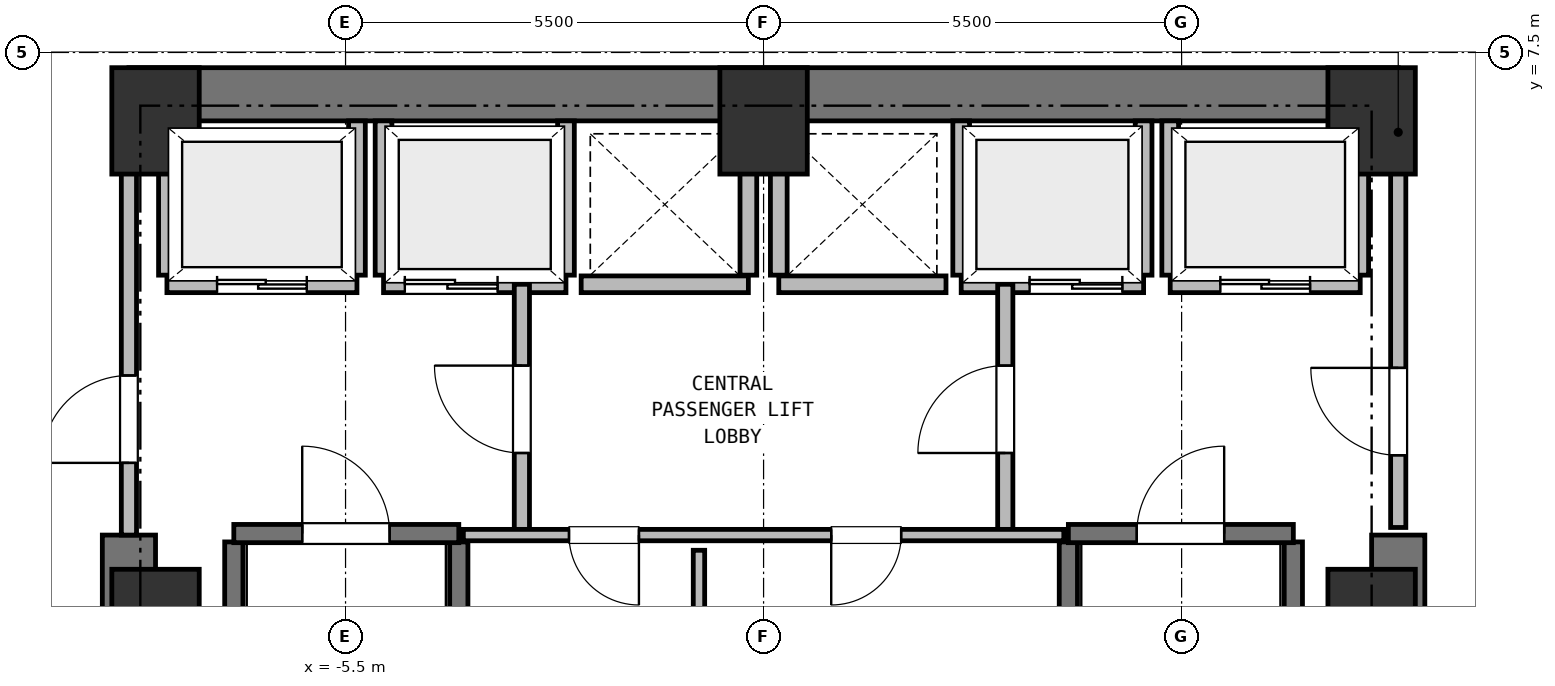
"""IFC4 building model, lengths in metres.
Left out: names, types, materials, properties, quantities, classifications, styles, units other than length and angle.
Written with IfcOpenShell. Run it as: python <this file> out.ifc"""

import sys

from ifc_helpers import new_model, si_unit, direction, frame, frame_2d, origin, origin_2d, place, context, subcontext, project, spatial, rectangle, extrude, element, fill, save


model = new_model("IFC4")
c1 = context("Model", 3, precision=1e-05, world=origin(), true_north=direction((0.0, 1.0)))
c2 = subcontext(c1, "Body", "Model", "MODEL_VIEW")
j1 = project(units=[si_unit("LENGTHUNIT", "METRE"), si_unit("PLANEANGLEUNIT", "RADIAN")], contexts=[c1])
p1 = place(None, origin())
s1 = spatial("IfcSite", under=j1, at=p1, CompositionType="ELEMENT")
p2 = place(p1, origin())
s2 = spatial("IfcBuilding", under=s1, at=p2, CompositionType="ELEMENT")
p3 = place(p2, frame((0.0, 0.0, 34.25)))
s3 = spatial("IfcBuildingStorey", under=s2, at=p3, CompositionType="ELEMENT", Elevation=34.25)
for number, where, z_axis, x_axis in (
    (1, (8.0, 0.0, 0.0), (0.0, 0.0, 1.0), (1.0, 0.0, 0.0)),
    (2, (8.0, 6.6, 0.0), (0.0, 0.0, 1.0), (1.0, 0.0, 0.0)),
    (3, (0.0, 6.6, 0.0), (0.0, 0.0, 1.0), (1.0, 0.0, 0.0)),
    (4, (-8.0, 6.6, 0.0), (0.0, 0.0, 1.0), (1.0, 0.0, 0.0)),
    (5, (-8.0, 0.0, 0.0), (0.0, 0.0, 1.0), (1.0, 0.0, 0.0)),
):
    element("IfcColumn", number, at=place(p3, frame(where, z_axis=z_axis, x_axis=x_axis)), inside=s3, PredefinedType="COLUMN", context=c2, shape_type="SweptSolid", body=[
        extrude(rectangle(XDim=1.15, YDim=1.4, at=origin_2d()), origin(), (0.0, 0.0, 1.0), 3.75),
    ])
p4 = place(p3, frame((-8.35, 6.95, 0.0), z_axis=(0.0, 0.0, 1.0), x_axis=(1.0, 0.0, 0.0)))
e6 = element("IfcWall", 6, at=p4, inside=s3, PredefinedType="SHEAR", context=c2, shape_type="SweptSolid", body=[
    extrude(rectangle(XDim=16.7, YDim=0.7, at=frame_2d((8.35, 0.0))), origin(), (0.0, 0.0, 1.0), 3.5),
])
for number, where, z_axis, x_axis in (
    (7, (-8.35, -6.95, 0.0), (0.0, 0.0, 1.0), (0.0, 1.0, 0.0)),
    (8, (8.35, -6.95, 0.0), (0.0, 0.0, 1.0), (0.0, 1.0, 0.0)),
):
    element("IfcWall", number, at=place(p3, frame(where, z_axis=z_axis, x_axis=x_axis)), inside=s3, PredefinedType="SHEAR", context=c2, shape_type="SweptSolid", body=[
        extrude(rectangle(XDim=8.1, YDim=0.7, at=frame_2d((4.05, 0.0))), origin(), (0.0, 0.0, 1.0), 3.5),
    ])
for number, where, z_axis, x_axis in (
    (9, (-6.97, -6.16, 0.0), (0.0, 0.0, 1.0), (0.0, 1.0, 0.0)),
    (10, (-4.01, -6.16, 0.0), (0.0, 0.0, 1.0), (0.0, 1.0, 0.0)),
):
    element("IfcWall", number, at=place(p3, frame(where, z_axis=z_axis, x_axis=x_axis)), inside=s3, PredefinedType="SHEAR", context=c2, shape_type="SweptSolid", body=[
        extrude(rectangle(XDim=7.22, YDim=0.24, at=frame_2d((3.61, 0.0))), origin(), (0.0, 0.0, 1.0), 3.5),
    ])
p5 = place(p3, frame((-6.97, 1.17, 0.0), z_axis=(0.0, 0.0, 1.0), x_axis=(1.0, 0.0, 0.0)))
e11 = element("IfcWall", 11, at=p5, inside=s3, PredefinedType="SHEAR", context=c2, shape_type="SweptSolid", body=[
    extrude(rectangle(XDim=2.96, YDim=0.24, at=frame_2d((1.48, 0.0))), origin(), (0.0, 0.0, 1.0), 3.5),
])
p6 = place(p5, frame((0.9, 0.0, 0.0)))
e12 = element("IfcOpeningElement", 12, at=p6, cuts=e11, PredefinedType="OPENING", context=c2, shape_type="SweptSolid", body=[
    extrude(rectangle(XDim=1.15, YDim=2.15, at=frame_2d((0.575, 1.075))), frame((0.0, 0.13, 0.0), z_axis=(0.0, -1.0, 0.0), x_axis=(1.0, 0.0, 0.0)), (0.0, 0.0, 1.0), 0.26),
])
for number, where, z_axis, x_axis in (
    (13, (4.01, -6.16, 0.0), (0.0, 0.0, 1.0), (0.0, 1.0, 0.0)),
    (14, (6.97, -6.16, 0.0), (0.0, 0.0, 1.0), (0.0, 1.0, 0.0)),
):
    element("IfcWall", number, at=place(p3, frame(where, z_axis=z_axis, x_axis=x_axis)), inside=s3, PredefinedType="SHEAR", context=c2, shape_type="SweptSolid", body=[
        extrude(rectangle(XDim=7.22, YDim=0.24, at=frame_2d((3.61, 0.0))), origin(), (0.0, 0.0, 1.0), 3.5),
    ])
p7 = place(p3, frame((4.01, 1.17, 0.0), z_axis=(0.0, 0.0, 1.0), x_axis=(1.0, 0.0, 0.0)))
e15 = element("IfcWall", 15, at=p7, inside=s3, PredefinedType="SHEAR", context=c2, shape_type="SweptSolid", body=[
    extrude(rectangle(XDim=2.96, YDim=0.24, at=frame_2d((1.48, 0.0))), origin(), (0.0, 0.0, 1.0), 3.5),
])
p8 = place(p7, frame((0.9, 0.0, 0.0)))
e16 = element("IfcOpeningElement", 16, at=p8, cuts=e15, PredefinedType="OPENING", context=c2, shape_type="SweptSolid", body=[
    extrude(rectangle(XDim=1.15, YDim=2.15, at=frame_2d((0.575, 1.075))), frame((0.0, 0.13, 0.0), z_axis=(0.0, -1.0, 0.0), x_axis=(1.0, 0.0, 0.0)), (0.0, 0.0, 1.0), 0.26),
])
p9 = place(p3, frame((-7.85, 4.45, 0.0), z_axis=(0.0, 0.0, 1.0), x_axis=(1.0, 0.0, 0.0)))
e17 = element("IfcWall", 17, at=p9, inside=s3, PredefinedType="PARTITIONING", context=c2, shape_type="SweptSolid", body=[
    extrude(rectangle(XDim=2.5, YDim=0.22, at=frame_2d((1.25, 0.0))), origin(), (0.0, 0.0, 1.0), 3.5),
])
p10 = place(p9, frame((0.66, 0.0, 0.0)))
e18 = element("IfcOpeningElement", 18, at=p10, cuts=e17, PredefinedType="OPENING", context=c2, shape_type="SweptSolid", body=[
    extrude(rectangle(XDim=1.18, YDim=2.15, at=frame_2d((0.59, 1.075))), frame((0.0, 0.12, 0.0), z_axis=(0.0, -1.0, 0.0), x_axis=(1.0, 0.0, 0.0)), (0.0, 0.0, 1.0), 0.24),
])
p11 = place(p3, frame((-7.85, 4.57, 0.0), z_axis=(0.0, 0.0, 1.0), x_axis=(0.0, 1.0, 0.0)))
e19 = element("IfcWall", 19, at=p11, inside=s3, PredefinedType="PARTITIONING", context=c2, shape_type="SweptSolid", body=[
    extrude(rectangle(XDim=2.03, YDim=0.22, at=frame_2d((1.015, 0.0))), origin(), (0.0, 0.0, 1.0), 3.08),
])
p12 = place(p3, frame((-5.35, 4.57, 0.0), z_axis=(0.0, 0.0, 1.0), x_axis=(0.0, 1.0, 0.0)))
e20 = element("IfcWall", 20, at=p12, inside=s3, PredefinedType="PARTITIONING", context=c2, shape_type="SweptSolid", body=[
    extrude(rectangle(XDim=2.03, YDim=0.22, at=frame_2d((1.015, 0.0))), origin(), (0.0, 0.0, 1.0), 3.5),
])
p13 = place(p3, frame((5.35, 4.45, 0.0), z_axis=(0.0, 0.0, 1.0), x_axis=(1.0, 0.0, 0.0)))
e21 = element("IfcWall", 21, at=p13, inside=s3, PredefinedType="PARTITIONING", context=c2, shape_type="SweptSolid", body=[
    extrude(rectangle(XDim=2.5, YDim=0.22, at=frame_2d((1.25, 0.0))), origin(), (0.0, 0.0, 1.0), 3.5),
])
p14 = place(p13, frame((0.66, 0.0, 0.0)))
e22 = element("IfcOpeningElement", 22, at=p14, cuts=e21, PredefinedType="OPENING", context=c2, shape_type="SweptSolid", body=[
    extrude(rectangle(XDim=1.18, YDim=2.15, at=frame_2d((0.59, 1.075))), frame((0.0, 0.12, 0.0), z_axis=(0.0, -1.0, 0.0), x_axis=(1.0, 0.0, 0.0)), (0.0, 0.0, 1.0), 0.24),
])
p15 = place(p3, frame((5.35, 4.57, 0.0), z_axis=(0.0, 0.0, 1.0), x_axis=(0.0, 1.0, 0.0)))
e23 = element("IfcWall", 23, at=p15, inside=s3, PredefinedType="PARTITIONING", context=c2, shape_type="SweptSolid", body=[
    extrude(rectangle(XDim=2.03, YDim=0.22, at=frame_2d((1.015, 0.0))), origin(), (0.0, 0.0, 1.0), 3.5),
])
p16 = place(p3, frame((7.85, 4.57, 0.0), z_axis=(0.0, 0.0, 1.0), x_axis=(0.0, 1.0, 0.0)))
e24 = element("IfcWall", 24, at=p16, inside=s3, PredefinedType="PARTITIONING", context=c2, shape_type="SweptSolid", body=[
    extrude(rectangle(XDim=2.03, YDim=0.22, at=frame_2d((1.015, 0.0))), origin(), (0.0, 0.0, 1.0), 3.08),
])
p17 = place(p3, frame((-5.0, 4.45, 0.0), z_axis=(0.0, 0.0, 1.0), x_axis=(1.0, 0.0, 0.0)))
e25 = element("IfcWall", 25, at=p17, inside=s3, PredefinedType="PARTITIONING", context=c2, shape_type="SweptSolid", body=[
    extrude(rectangle(XDim=2.4, YDim=0.22, at=frame_2d((1.2, 0.0))), origin(), (0.0, 0.0, 1.0), 3.5),
])
p18 = place(p17, frame((0.28, 0.0, 0.0)))
e26 = element("IfcOpeningElement", 26, at=p18, cuts=e25, PredefinedType="OPENING", context=c2, shape_type="SweptSolid", body=[
    extrude(rectangle(XDim=1.22, YDim=2.15, at=frame_2d((0.61, 1.075))), frame((0.0, 0.12, 0.0), z_axis=(0.0, -1.0, 0.0), x_axis=(1.0, 0.0, 0.0)), (0.0, 0.0, 1.0), 0.24),
])
for number, where, z_axis, x_axis in (
    (27, (-5.0, 4.57, 0.0), (0.0, 0.0, 1.0), (0.0, 1.0, 0.0)),
    (28, (-2.6, 4.57, 0.0), (0.0, 0.0, 1.0), (0.0, 1.0, 0.0)),
):
    element("IfcWall", number, at=place(p3, frame(where, z_axis=z_axis, x_axis=x_axis)), inside=s3, PredefinedType="PARTITIONING", context=c2, shape_type="SweptSolid", body=[
        extrude(rectangle(XDim=2.03, YDim=0.22, at=frame_2d((1.015, 0.0))), origin(), (0.0, 0.0, 1.0), 3.5),
    ])
p19 = place(p3, frame((2.6, 4.45, 0.0), z_axis=(0.0, 0.0, 1.0), x_axis=(1.0, 0.0, 0.0)))
e29 = element("IfcWall", 29, at=p19, inside=s3, PredefinedType="PARTITIONING", context=c2, shape_type="SweptSolid", body=[
    extrude(rectangle(XDim=2.4, YDim=0.22, at=frame_2d((1.2, 0.0))), origin(), (0.0, 0.0, 1.0), 3.5),
])
p20 = place(p19, frame((0.9, 0.0, 0.0)))
e30 = element("IfcOpeningElement", 30, at=p20, cuts=e29, PredefinedType="OPENING", context=c2, shape_type="SweptSolid", body=[
    extrude(rectangle(XDim=1.22, YDim=2.15, at=frame_2d((0.61, 1.075))), frame((0.0, 0.12, 0.0), z_axis=(0.0, -1.0, 0.0), x_axis=(1.0, 0.0, 0.0)), (0.0, 0.0, 1.0), 0.24),
])
for number, where, z_axis, x_axis in (
    (31, (2.6, 4.57, 0.0), (0.0, 0.0, 1.0), (0.0, 1.0, 0.0)),
    (32, (5.0, 4.57, 0.0), (0.0, 0.0, 1.0), (0.0, 1.0, 0.0)),
):
    element("IfcWall", number, at=place(p3, frame(where, z_axis=z_axis, x_axis=x_axis)), inside=s3, PredefinedType="PARTITIONING", context=c2, shape_type="SweptSolid", body=[
        extrude(rectangle(XDim=2.03, YDim=0.22, at=frame_2d((1.015, 0.0))), origin(), (0.0, 0.0, 1.0), 3.5),
    ])
p21 = place(p3, frame((-2.4, 4.45, 0.0), z_axis=(0.0, 0.0, 1.0), x_axis=(1.0, 0.0, 0.0)))
e33 = element("IfcWall", 33, at=p21, inside=s3, PredefinedType="PARTITIONING", context=c2, shape_type="SweptSolid", body=[
    extrude(rectangle(XDim=2.2, YDim=0.22, at=frame_2d((1.1, 0.0))), origin(), (0.0, 0.0, 1.0), 3.5),
])
p22 = place(p3, frame((-0.2, 4.57, 0.0), z_axis=(0.0, 0.0, 1.0), x_axis=(0.0, 1.0, 0.0)))
e34 = element("IfcWall", 34, at=p22, inside=s3, PredefinedType="PARTITIONING", context=c2, shape_type="SweptSolid", body=[
    extrude(rectangle(XDim=2.03, YDim=0.22, at=frame_2d((1.015, 0.0))), origin(), (0.0, 0.0, 1.0), 3.5),
])
p23 = place(p3, frame((0.2, 4.45, 0.0), z_axis=(0.0, 0.0, 1.0), x_axis=(1.0, 0.0, 0.0)))
e35 = element("IfcWall", 35, at=p23, inside=s3, PredefinedType="PARTITIONING", context=c2, shape_type="SweptSolid", body=[
    extrude(rectangle(XDim=2.2, YDim=0.22, at=frame_2d((1.1, 0.0))), origin(), (0.0, 0.0, 1.0), 3.5),
])
p24 = place(p3, frame((0.2, 4.57, 0.0), z_axis=(0.0, 0.0, 1.0), x_axis=(0.0, 1.0, 0.0)))
e36 = element("IfcWall", 36, at=p24, inside=s3, PredefinedType="PARTITIONING", context=c2, shape_type="SweptSolid", body=[
    extrude(rectangle(XDim=2.03, YDim=0.22, at=frame_2d((1.015, 0.0))), origin(), (0.0, 0.0, 1.0), 3.5),
])
p25 = place(p3, frame((-3.18, 1.15, 0.0), z_axis=(0.0, 0.0, 1.0), x_axis=(0.0, 1.0, 0.0)))
e37 = element("IfcWall", 37, at=p25, inside=s3, PredefinedType="PARTITIONING", context=c2, shape_type="SweptSolid", body=[
    extrude(rectangle(XDim=3.3, YDim=0.2, at=frame_2d((1.65, 0.0))), origin(), (0.0, 0.0, 1.0), 3.5),
])
p26 = place(p25, frame((1.08, 0.0, 0.0)))
e38 = element("IfcOpeningElement", 38, at=p26, cuts=e37, PredefinedType="OPENING", context=c2, shape_type="SweptSolid", body=[
    extrude(rectangle(XDim=1.15, YDim=2.15, at=frame_2d((0.575, 1.075))), frame((0.0, 0.11, 0.0), z_axis=(0.0, -1.0, 0.0), x_axis=(1.0, 0.0, 0.0)), (0.0, 0.0, 1.0), 0.22),
])
p27 = place(p3, frame((3.18, 1.15, 0.0), z_axis=(0.0, 0.0, 1.0), x_axis=(0.0, 1.0, 0.0)))
e39 = element("IfcWall", 39, at=p27, inside=s3, PredefinedType="PARTITIONING", context=c2, shape_type="SweptSolid", body=[
    extrude(rectangle(XDim=3.3, YDim=0.2, at=frame_2d((1.65, 0.0))), origin(), (0.0, 0.0, 1.0), 3.5),
])
p28 = place(p27, frame((1.08, 0.0, 0.0)))
e40 = element("IfcOpeningElement", 40, at=p28, cuts=e39, PredefinedType="OPENING", context=c2, shape_type="SweptSolid", body=[
    extrude(rectangle(XDim=1.15, YDim=2.15, at=frame_2d((0.575, 1.075))), frame((0.0, 0.11, 0.0), z_axis=(0.0, -1.0, 0.0), x_axis=(1.0, 0.0, 0.0)), (0.0, 0.0, 1.0), 0.22),
])
p29 = place(p3, frame((-8.35, 1.15, 0.0), z_axis=(0.0, 0.0, 1.0), x_axis=(0.0, 1.0, 0.0)))
e41 = element("IfcWall", 41, at=p29, inside=s3, PredefinedType="PARTITIONING", context=c2, shape_type="SweptSolid", body=[
    extrude(rectangle(XDim=5.4, YDim=0.2, at=frame_2d((2.7, 0.0))), origin(), (0.0, 0.0, 1.0), 3.5),
])
p30 = place(p29, frame((0.95, 0.0, 0.0)))
e42 = element("IfcOpeningElement", 42, at=p30, cuts=e41, PredefinedType="OPENING", context=c2, shape_type="SweptSolid", body=[
    extrude(rectangle(XDim=1.15, YDim=2.15, at=frame_2d((0.575, 1.075))), frame((0.0, 0.11, 0.0), z_axis=(0.0, -1.0, 0.0), x_axis=(1.0, 0.0, 0.0)), (0.0, 0.0, 1.0), 0.22),
])
p31 = place(p3, frame((8.35, 1.25, 0.0), z_axis=(0.0, 0.0, 1.0), x_axis=(0.0, 1.0, 0.0)))
e43 = element("IfcWall", 43, at=p31, inside=s3, PredefinedType="PARTITIONING", context=c2, shape_type="SweptSolid", body=[
    extrude(rectangle(XDim=5.3, YDim=0.2, at=frame_2d((2.65, 0.0))), origin(), (0.0, 0.0, 1.0), 3.5),
])
p32 = place(p31, frame((0.95, 0.0, 0.0)))
e44 = element("IfcOpeningElement", 44, at=p32, cuts=e43, PredefinedType="OPENING", context=c2, shape_type="SweptSolid", body=[
    extrude(rectangle(XDim=1.15, YDim=2.15, at=frame_2d((0.575, 1.075))), frame((0.0, 0.11, 0.0), z_axis=(0.0, -1.0, 0.0), x_axis=(1.0, 0.0, 0.0)), (0.0, 0.0, 1.0), 0.22),
])
p33 = place(p3, frame((3.95, 1.15, 0.0), z_axis=(0.0, 0.0, 1.0), x_axis=(-1.0, 0.0, 0.0)))
e45 = element("IfcWall", 45, at=p33, inside=s3, PredefinedType="PARTITIONING", context=c2, shape_type="SweptSolid", body=[
    extrude(rectangle(XDim=7.9, YDim=0.15, at=frame_2d((3.95, 0.0))), origin(), (0.0, 0.0, 1.0), 3.5),
])
p34 = place(p33, frame((5.59, 0.0, 0.0)))
e46 = element("IfcOpeningElement", 46, at=p34, cuts=e45, PredefinedType="OPENING", context=c2, shape_type="SweptSolid", body=[
    extrude(rectangle(XDim=0.92, YDim=2.05, at=frame_2d((0.46, 1.025))), frame((0.0, 0.085, 0.0), z_axis=(0.0, -1.0, 0.0), x_axis=(1.0, 0.0, 0.0)), (0.0, 0.0, 1.0), 0.17),
])
p35 = place(p33, frame((2.14, 0.0, 0.0)))
e47 = element("IfcOpeningElement", 47, at=p35, cuts=e45, PredefinedType="OPENING", context=c2, shape_type="SweptSolid", body=[
    extrude(rectangle(XDim=0.92, YDim=2.05, at=frame_2d((0.46, 1.025))), frame((0.0, 0.085, 0.0), z_axis=(0.0, -1.0, 0.0), x_axis=(1.0, 0.0, 0.0)), (0.0, 0.0, 1.0), 0.17),
])
p36 = place(p3, frame((-0.85, -4.08, 0.0), z_axis=(0.0, 0.0, 1.0), x_axis=(0.0, 1.0, 0.0)))
e48 = element("IfcWall", 48, at=p36, inside=s3, PredefinedType="PARTITIONING", context=c2, shape_type="SweptSolid", body=[
    extrude(rectangle(XDim=5.03, YDim=0.15, at=frame_2d((2.515, 0.0))), origin(), (0.0, 0.0, 1.0), 3.5),
])
for number, where, z_axis, x_axis in (
    (49, (8.578, 9.352, 0.0), (0.0, 0.0, 1.0), (0.707, -0.707, 0.0)),
    (50, (-10.752, 7.178, 0.0), (0.0, 0.0, 1.0), (0.707, 0.707, 0.0)),
):
    element("IfcWall", number, at=place(p3, frame(where, z_axis=z_axis, x_axis=x_axis)), inside=s3, PredefinedType="PARTITIONING", context=c2, shape_type="SweptSolid", body=[
        extrude(rectangle(XDim=3.074, YDim=0.15, at=frame_2d((1.537, 0.0))), origin(), (0.0, 0.0, 1.0), 3.5),
    ])
p37 = place(p6, origin())
e51 = element("IfcDoor", 51, at=p37, inside=s3, OperationType="SINGLE_SWING_LEFT", PredefinedType="DOOR", context=c2, shape_type="SweptSolid", body=[
    extrude(rectangle(XDim=1.15, YDim=2.15, at=frame_2d((0.575, 1.075))), frame((0.0, 0.025, 0.0), z_axis=(0.0, -1.0, 0.0), x_axis=(1.0, 0.0, 0.0)), (0.0, 0.0, 1.0), 0.05),
])
fill(e12, e51)
p38 = place(p8, origin())
e52 = element("IfcDoor", 52, at=p38, inside=s3, OperationType="SINGLE_SWING_RIGHT", PredefinedType="DOOR", context=c2, shape_type="SweptSolid", body=[
    extrude(rectangle(XDim=1.15, YDim=2.15, at=frame_2d((0.575, 1.075))), frame((0.0, 0.025, 0.0), z_axis=(0.0, -1.0, 0.0), x_axis=(1.0, 0.0, 0.0)), (0.0, 0.0, 1.0), 0.05),
])
fill(e16, e52)
p39 = place(p10, origin())
e53 = element("IfcDoor", 53, at=p39, inside=s3, OperationType="DOUBLE_DOOR_SLIDING", PredefinedType="DOOR", context=c2, shape_type="SweptSolid", body=[
    extrude(rectangle(XDim=1.18, YDim=2.15, at=frame_2d((0.59, 1.075))), frame((0.0, 0.025, 0.0), z_axis=(0.0, -1.0, 0.0), x_axis=(1.0, 0.0, 0.0)), (0.0, 0.0, 1.0), 0.05),
])
fill(e18, e53)
p40 = place(p14, origin())
e54 = element("IfcDoor", 54, at=p40, inside=s3, OperationType="DOUBLE_DOOR_SLIDING", PredefinedType="DOOR", context=c2, shape_type="SweptSolid", body=[
    extrude(rectangle(XDim=1.18, YDim=2.15, at=frame_2d((0.59, 1.075))), frame((0.0, 0.025, 0.0), z_axis=(0.0, -1.0, 0.0), x_axis=(1.0, 0.0, 0.0)), (0.0, 0.0, 1.0), 0.05),
])
fill(e22, e54)
p41 = place(p18, origin())
e55 = element("IfcDoor", 55, at=p41, inside=s3, OperationType="DOUBLE_DOOR_SLIDING", PredefinedType="DOOR", context=c2, shape_type="SweptSolid", body=[
    extrude(rectangle(XDim=1.22, YDim=2.15, at=frame_2d((0.61, 1.075))), frame((0.0, 0.025, 0.0), z_axis=(0.0, -1.0, 0.0), x_axis=(1.0, 0.0, 0.0)), (0.0, 0.0, 1.0), 0.05),
])
fill(e26, e55)
p42 = place(p20, origin())
e56 = element("IfcDoor", 56, at=p42, inside=s3, OperationType="DOUBLE_DOOR_SLIDING", PredefinedType="DOOR", context=c2, shape_type="SweptSolid", body=[
    extrude(rectangle(XDim=1.22, YDim=2.15, at=frame_2d((0.61, 1.075))), frame((0.0, 0.025, 0.0), z_axis=(0.0, -1.0, 0.0), x_axis=(1.0, 0.0, 0.0)), (0.0, 0.0, 1.0), 0.05),
])
fill(e30, e56)
p43 = place(p26, origin())
e57 = element("IfcDoor", 57, at=p43, inside=s3, OperationType="SINGLE_SWING_RIGHT", PredefinedType="DOOR", context=c2, shape_type="SweptSolid", body=[
    extrude(rectangle(XDim=1.15, YDim=2.15, at=frame_2d((0.575, 1.075))), frame((0.0, 0.025, 0.0), z_axis=(0.0, -1.0, 0.0), x_axis=(1.0, 0.0, 0.0)), (0.0, 0.0, 1.0), 0.05),
])
fill(e38, e57)
p44 = place(p28, origin())
e58 = element("IfcDoor", 58, at=p44, inside=s3, OperationType="SINGLE_SWING_LEFT", PredefinedType="DOOR", context=c2, shape_type="SweptSolid", body=[
    extrude(rectangle(XDim=1.15, YDim=2.15, at=frame_2d((0.575, 1.075))), frame((0.0, 0.025, 0.0), z_axis=(0.0, -1.0, 0.0), x_axis=(1.0, 0.0, 0.0)), (0.0, 0.0, 1.0), 0.05),
])
fill(e40, e58)
p45 = place(p30, origin())
e59 = element("IfcDoor", 59, at=p45, inside=s3, OperationType="SINGLE_SWING_LEFT", PredefinedType="DOOR", context=c2, shape_type="SweptSolid", body=[
    extrude(rectangle(XDim=1.15, YDim=2.15, at=frame_2d((0.575, 1.075))), frame((0.0, 0.025, 0.0), z_axis=(0.0, -1.0, 0.0), x_axis=(1.0, 0.0, 0.0)), (0.0, 0.0, 1.0), 0.05),
])
fill(e42, e59)
p46 = place(p32, origin())
e60 = element("IfcDoor", 60, at=p46, inside=s3, OperationType="SINGLE_SWING_RIGHT", PredefinedType="DOOR", context=c2, shape_type="SweptSolid", body=[
    extrude(rectangle(XDim=1.15, YDim=2.15, at=frame_2d((0.575, 1.075))), frame((0.0, 0.025, 0.0), z_axis=(0.0, -1.0, 0.0), x_axis=(1.0, 0.0, 0.0)), (0.0, 0.0, 1.0), 0.05),
])
fill(e44, e60)
p47 = place(p34, origin())
e61 = element("IfcDoor", 61, at=p47, inside=s3, OperationType="SINGLE_SWING_LEFT", PredefinedType="DOOR", context=c2, shape_type="SweptSolid", body=[
    extrude(rectangle(XDim=0.92, YDim=2.05, at=frame_2d((0.46, 1.025))), frame((0.0, 0.025, 0.0), z_axis=(0.0, -1.0, 0.0), x_axis=(1.0, 0.0, 0.0)), (0.0, 0.0, 1.0), 0.05),
])
fill(e46, e61)
p48 = place(p35, origin())
e62 = element("IfcDoor", 62, at=p48, inside=s3, OperationType="SINGLE_SWING_RIGHT", PredefinedType="DOOR", context=c2, shape_type="SweptSolid", body=[
    extrude(rectangle(XDim=0.92, YDim=2.05, at=frame_2d((0.46, 1.025))), frame((0.0, 0.025, 0.0), z_axis=(0.0, -1.0, 0.0), x_axis=(1.0, 0.0, 0.0)), (0.0, 0.0, 1.0), 0.05),
])
fill(e47, e62)
save(model, sys.argv[1])
